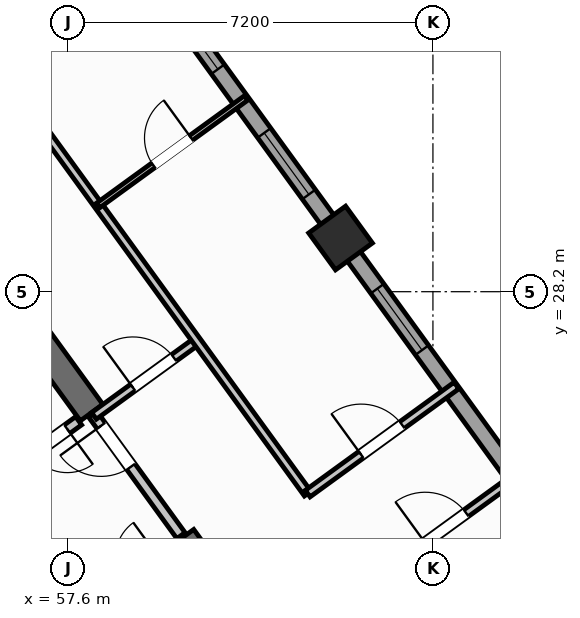
"""IFC4 building model, lengths in metres.
Left out: names, types, materials, properties, quantities, classifications, styles, units other than length and angle.
Written with IfcOpenShell. Run it as: python <this file> out.ifc"""

import sys

from ifc_helpers import new_model, si_unit, direction, frame, frame_2d, origin, origin_2d, place, context, subcontext, project, spatial, rectangle, hollow_rectangle, extrude, source, transform, mapped, element, fill, save


model = new_model("IFC4")
c1 = context("Model", 3, precision=1e-05, world=origin(), true_north=direction((0.0, 1.0)))
c2 = subcontext(c1, "Body", "Model", "MODEL_VIEW")
j1 = project(units=[si_unit("LENGTHUNIT", "METRE"), si_unit("PLANEANGLEUNIT", "RADIAN")], contexts=[c1])
p1 = place(None, origin())
s1 = spatial("IfcSite", under=j1, at=p1, CompositionType="ELEMENT")
p2 = place(p1, origin())
s2 = spatial("IfcBuilding", under=s1, at=p2, CompositionType="ELEMENT")
p3 = place(p2, frame((0.0, 0.0, 165.9)))
s3 = spatial("IfcBuildingStorey", under=s2, at=p3, CompositionType="ELEMENT", Elevation=165.9)
p4 = place(p3, frame((61.958, 20.454, 0.0), z_axis=(0.0, 0.0, 1.0), x_axis=(-0.587802113096, 0.809004744015, 0.0)))
e1 = element("IfcWall", 1, at=p4, inside=s3, PredefinedType="SHEAR", context=c2, shape_type="SweptSolid", body=[
    extrude(rectangle(XDim=3.575, YDim=0.55, at=frame_2d((1.788, 0.0))), origin(), (0.0, 0.0, 1.0), 3.32),
])
p5 = place(p3, frame((58.064, 25.813, 0.0), z_axis=(0.0, 0.0, 1.0), x_axis=(-0.587764933797, 0.809031756236, 0.0)))
e2 = element("IfcWall", 2, at=p5, inside=s3, PredefinedType="SHEAR", context=c2, shape_type="SweptSolid", body=[
    extrude(rectangle(XDim=6.425, YDim=0.55, at=frame_2d((3.212, 0.0))), origin(), (0.0, 0.0, 1.0), 3.32),
])
m1 = source(origin(), c2, "Body", "SweptSolid", [
    extrude(hollow_rectangle(XDim=0.9, YDim=0.9, WallThickness=0.036, at=origin_2d()), origin(), (0.0, 0.0, 1.0), 3.6),
])
p6 = place(p3, frame((62.977, 29.259, 0.0), z_axis=(0.0, 0.0, 1.0), x_axis=(0.809016994375, 0.587785252292, 0.0)))
e3 = element("IfcColumn", 3, at=p6, inside=s3, PredefinedType="COLUMN", context=c2, shape_type="MappedRepresentation", body=[
    mapped(m1, transform((0.0, 0.0, 0.0), scale=1.0)),
])
p7 = place(p3, frame((43.938, 25.192, 0.0), z_axis=(0.0, 0.0, 1.0), x_axis=(0.809016324578, 0.587786174187, 0.0)))
e4 = element("IfcWall", 4, at=p7, inside=s3, PredefinedType="STANDARD", context=c2, shape_type="SweptSolid", body=[
    extrude(rectangle(XDim=17.587, YDim=0.32, at=frame_2d((8.794, 0.0))), origin(), (0.0, 0.0, 1.0), 3.32),
])
p8 = place(p7, frame((14.914, 0.0, 0.0)))
e5 = element("IfcOpeningElement", 5, at=p8, cuts=e4, PredefinedType="OPENING", context=c2, shape_type="SweptSolid", body=[
    extrude(rectangle(XDim=1.05, YDim=2.15, at=frame_2d((0.525, 1.075))), frame((0.0, 0.17, 0.0), z_axis=(0.0, -1.0, 0.0), x_axis=(1.0, 0.0, 0.0)), (0.0, 0.0, 1.0), 0.34),
])
p9 = place(p7, frame((2.144, 0.0, 0.8)))
e6 = element("IfcOpeningElement", 6, at=p9, cuts=e4, PredefinedType="OPENING", context=c2, shape_type="SweptSolid", body=[
    extrude(rectangle(XDim=2.1, YDim=1.55, at=frame_2d((1.05, 0.775))), frame((0.0, 0.17, 0.0), z_axis=(0.0, -1.0, 0.0), x_axis=(1.0, 0.0, 0.0)), (0.0, 0.0, 1.0), 0.34),
])
p10 = place(p7, frame((7.344, 0.0, 0.8)))
e7 = element("IfcOpeningElement", 7, at=p10, cuts=e4, PredefinedType="OPENING", context=c2, shape_type="SweptSolid", body=[
    extrude(rectangle(XDim=2.1, YDim=1.55, at=frame_2d((1.05, 0.775))), frame((0.0, 0.17, 0.0), z_axis=(0.0, -1.0, 0.0), x_axis=(1.0, 0.0, 0.0)), (0.0, 0.0, 1.0), 0.34),
])
p11 = place(p3, frame((58.455, 35.484, 0.0), z_axis=(0.0, 0.0, 1.0), x_axis=(0.587783625747, -0.809018176127, 0.0)))
e8 = element("IfcWall", 8, at=p11, inside=s3, PredefinedType="STANDARD", context=c2, shape_type="SweptSolid", body=[
    extrude(rectangle(XDim=21.587, YDim=0.32, at=frame_2d((10.794, 0.0))), origin(), (0.0, 0.0, 1.0), 2.795),
])
p12 = place(p11, frame((1.475, 0.0, 0.8)))
e9 = element("IfcOpeningElement", 9, at=p12, cuts=e8, PredefinedType="OPENING", context=c2, shape_type="SweptSolid", body=[
    extrude(rectangle(XDim=2.1, YDim=1.55, at=frame_2d((1.05, 0.775))), frame((0.0, 0.17, 0.0), z_axis=(0.0, -1.0, 0.0), x_axis=(1.0, 0.0, 0.0)), (0.0, 0.0, 1.0), 0.34),
])
p13 = place(p11, frame((5.13, 0.0, 0.85)))
e10 = element("IfcOpeningElement", 10, at=p13, cuts=e8, PredefinedType="OPENING", context=c2, shape_type="SweptSolid", body=[
    extrude(rectangle(XDim=1.5, YDim=1.5, at=frame_2d((0.75, 0.75))), frame((0.0, 0.17, 0.0), z_axis=(0.0, -1.0, 0.0), x_axis=(1.0, 0.0, 0.0)), (0.0, 0.0, 1.0), 0.34),
])
p14 = place(p11, frame((8.929, 0.0, 0.85)))
e11 = element("IfcOpeningElement", 11, at=p14, cuts=e8, PredefinedType="OPENING", context=c2, shape_type="SweptSolid", body=[
    extrude(rectangle(XDim=1.5, YDim=1.5, at=frame_2d((0.75, 0.75))), frame((0.0, 0.17, 0.0), z_axis=(0.0, -1.0, 0.0), x_axis=(1.0, 0.0, 0.0)), (0.0, 0.0, 1.0), 0.34),
])
p15 = place(p11, frame((17.581, 0.0, 0.95)))
e12 = element("IfcOpeningElement", 12, at=p15, cuts=e8, PredefinedType="OPENING", context=c2, shape_type="SweptSolid", body=[
    extrude(rectangle(XDim=1.2, YDim=1.4, at=frame_2d((0.6, 0.7))), frame((0.0, 0.17, 0.0), z_axis=(0.0, -1.0, 0.0), x_axis=(1.0, 0.0, 0.0)), (0.0, 0.0, 1.0), 0.34),
])
p16 = place(p3, frame((53.425, 22.468, 0.0), z_axis=(0.0, 0.0, 1.0), x_axis=(0.809024377198, 0.587775090574, 0.0)))
e13 = element("IfcWall", 13, at=p16, inside=s3, PredefinedType="STANDARD", context=c2, shape_type="SweptSolid", body=[
    extrude(rectangle(XDim=5.418, YDim=0.2, at=frame_2d((2.709, 0.0))), origin(), (0.0, 0.0, 1.0), 3.31),
])
p17 = place(p16, frame((4.28, 0.0, 0.0)))
e14 = element("IfcOpeningElement", 14, at=p17, cuts=e13, PredefinedType="OPENING", context=c2, shape_type="SweptSolid", body=[
    extrude(rectangle(XDim=0.86, YDim=2.05, at=frame_2d((0.43, 1.025))), frame((0.0, 0.11, 0.0), z_axis=(0.0, -1.0, 0.0), x_axis=(1.0, 0.0, 0.0)), (0.0, 0.0, 1.0), 0.22),
])
p18 = place(p16, frame((1.45, 0.0, 0.0)))
e15 = element("IfcOpeningElement", 15, at=p18, cuts=e13, PredefinedType="OPENING", context=c2, shape_type="SweptSolid", body=[
    extrude(rectangle(XDim=0.86, YDim=2.05, at=frame_2d((0.43, 1.025))), frame((0.0, 0.11, 0.0), z_axis=(0.0, -1.0, 0.0), x_axis=(1.0, 0.0, 0.0)), (0.0, 0.0, 1.0), 0.22),
])
p19 = place(p3, frame((59.827, 23.386, 0.0), z_axis=(0.0, 0.0, 1.0), x_axis=(-0.587803840107, 0.809003489211, 0.0)))
e16 = element("IfcWall", 16, at=p19, inside=s3, PredefinedType="STANDARD", context=c2, shape_type="SweptSolid", body=[
    extrude(rectangle(XDim=2.96, YDim=0.2, at=frame_2d((1.48, 0.0))), origin(), (0.0, 0.0, 1.0), 3.31),
])
p20 = place(p19, frame((1.68, 0.0, 0.0)))
e17 = element("IfcOpeningElement", 17, at=p20, cuts=e16, PredefinedType="OPENING", context=c2, shape_type="SweptSolid", body=[
    extrude(rectangle(XDim=1.0, YDim=2.1, at=frame_2d((0.5, 1.05))), frame((0.0, 0.11, 0.0), z_axis=(0.0, -1.0, 0.0), x_axis=(1.0, 0.0, 0.0)), (0.0, 0.0, 1.0), 0.22),
])
p21 = place(p3, frame((58.111, 25.749, 0.0), z_axis=(0.0, 0.0, 1.0), x_axis=(0.809000999347, 0.58780726693, 0.0)))
e18 = element("IfcWall", 18, at=p21, inside=s3, PredefinedType="PARTITIONING", context=c2, shape_type="SweptSolid", body=[
    extrude(rectangle(XDim=2.51, YDim=0.16, at=frame_2d((1.255, 0.0))), origin(), (0.0, 0.0, 1.0), 2.795),
])
p22 = place(p21, frame((0.95, 0.0, 0.0)))
e19 = element("IfcOpeningElement", 19, at=p22, cuts=e18, PredefinedType="OPENING", context=c2, shape_type="SweptSolid", body=[
    extrude(rectangle(XDim=1.0, YDim=2.1, at=frame_2d((0.5, 1.05))), frame((0.0, 0.09, 0.0), z_axis=(0.0, -1.0, 0.0), x_axis=(1.0, 0.0, 0.0)), (0.0, 0.0, 1.0), 0.18),
])
p23 = place(p3, frame((62.328, 24.215, 0.0), z_axis=(0.0, 0.0, 1.0), x_axis=(-0.587778600963, 0.809021826807, 0.0)))
e20 = element("IfcWall", 20, at=p23, inside=s3, PredefinedType="PARTITIONING", context=c2, shape_type="SweptSolid", body=[
    extrude(rectangle(XDim=11.45, YDim=0.16, at=frame_2d((5.725, 0.0))), origin(), (0.0, 0.0, 1.0), 3.31),
])
p24 = place(p3, frame((63.592, 22.475, 0.0), z_axis=(0.0, 0.0, 1.0), x_axis=(0.809035546126, 0.58775971715, 0.0)))
e21 = element("IfcWall", 21, at=p24, inside=s3, PredefinedType="PARTITIONING", context=c2, shape_type="SweptSolid", body=[
    extrude(rectangle(XDim=3.63, YDim=0.16, at=frame_2d((1.815, 0.0))), origin(), (0.0, 0.0, 1.0), 3.31),
])
p25 = place(p24, frame((1.305, 0.0, 0.0)))
e22 = element("IfcOpeningElement", 22, at=p25, cuts=e21, PredefinedType="OPENING", context=c2, shape_type="SweptSolid", body=[
    extrude(rectangle(XDim=1.0, YDim=2.1, at=frame_2d((0.5, 1.05))), frame((0.0, 0.09, 0.0), z_axis=(0.0, -1.0, 0.0), x_axis=(1.0, 0.0, 0.0)), (0.0, 0.0, 1.0), 0.18),
])
p26 = place(p3, frame((62.328, 24.215, 0.0), z_axis=(0.0, 0.0, 1.0), x_axis=(0.809003564202, 0.587803736896, 0.0)))
e23 = element("IfcWall", 23, at=p26, inside=s3, PredefinedType="PARTITIONING", context=c2, shape_type="SweptSolid", body=[
    extrude(rectangle(XDim=3.63, YDim=0.16, at=frame_2d((1.815, 0.0))), origin(), (0.0, 0.0, 1.0), 3.31),
])
p27 = place(p26, frame((1.305, 0.0, 0.0)))
e24 = element("IfcOpeningElement", 24, at=p27, cuts=e23, PredefinedType="OPENING", context=c2, shape_type="SweptSolid", body=[
    extrude(rectangle(XDim=1.0, YDim=2.1, at=frame_2d((0.5, 1.05))), frame((0.0, 0.09, 0.0), z_axis=(0.0, -1.0, 0.0), x_axis=(1.0, 0.0, 0.0)), (0.0, 0.0, 1.0), 0.18),
])
p28 = place(p3, frame((58.195, 29.904, 0.0), z_axis=(0.0, 0.0, 1.0), x_axis=(0.809005039917, 0.58780170584, 0.0)))
e25 = element("IfcWall", 25, at=p28, inside=s3, PredefinedType="PARTITIONING", context=c2, shape_type="SweptSolid", body=[
    extrude(rectangle(XDim=3.61, YDim=0.11, at=frame_2d((1.805, 0.0))), origin(), (0.0, 0.0, 1.0), 3.31),
])
p29 = place(p28, frame((1.345, 0.0, 0.0)))
e26 = element("IfcOpeningElement", 26, at=p29, cuts=e25, PredefinedType="OPENING", context=c2, shape_type="SweptSolid", body=[
    extrude(rectangle(XDim=0.92, YDim=2.08, at=frame_2d((0.46, 1.04))), frame((0.0, 0.065, 0.0), z_axis=(0.0, -1.0, 0.0), x_axis=(1.0, 0.0, 0.0)), (0.0, 0.0, 1.0), 0.13),
])
m2 = source(origin(), c2, "Body", "SweptSolid", [
    extrude(rectangle(XDim=2.1, YDim=1.55, at=frame_2d((1.05, 0.775))), frame((0.0, 0.03, 0.0), z_axis=(0.0, -1.0, 0.0), x_axis=(1.0, 0.0, 0.0)), (0.0, 0.0, 1.0), 0.06),
])
p30 = place(p12, origin())
e27 = element("IfcWindow", 27, at=p30, inside=s3, PartitioningType="SINGLE_PANEL", PredefinedType="WINDOW", context=c2, shape_type="MappedRepresentation", body=[
    mapped(m2, transform((0.0, 0.0, 0.0), scale=1.0)),
])
fill(e9, e27)
m3 = source(origin(), c2, "Body", "SweptSolid", [
    extrude(rectangle(XDim=1.5, YDim=1.5, at=frame_2d((0.75, 0.75))), frame((0.0, 0.03, 0.0), z_axis=(0.0, -1.0, 0.0), x_axis=(1.0, 0.0, 0.0)), (0.0, 0.0, 1.0), 0.06),
])
p31 = place(p13, origin())
e28 = element("IfcWindow", 28, at=p31, inside=s3, PartitioningType="SINGLE_PANEL", PredefinedType="WINDOW", context=c2, shape_type="MappedRepresentation", body=[
    mapped(m3, transform((0.0, 0.0, 0.0), scale=1.0)),
])
fill(e10, e28)
p32 = place(p14, origin())
e29 = element("IfcWindow", 29, at=p32, inside=s3, PartitioningType="SINGLE_PANEL", PredefinedType="WINDOW", context=c2, shape_type="MappedRepresentation", body=[
    mapped(m3, transform((0.0, 0.0, 0.0), scale=1.0)),
])
fill(e11, e29)
m4 = source(origin(), c2, "Body", "SweptSolid", [
    extrude(rectangle(XDim=0.86, YDim=2.05, at=frame_2d((0.43, 1.025))), frame((0.0, 0.025, 0.0), z_axis=(0.0, -1.0, 0.0), x_axis=(1.0, 0.0, 0.0)), (0.0, 0.0, 1.0), 0.05),
])
p33 = place(p17, frame((0.86, 0.0, 0.0), z_axis=(0.0, 0.0, 1.0), x_axis=(-1.0, 0.0, 0.0)))
e30 = element("IfcDoor", 30, at=p33, inside=s3, OperationType="SINGLE_SWING_LEFT", PredefinedType="DOOR", context=c2, shape_type="MappedRepresentation", body=[
    mapped(m4, transform((0.0, 0.0, 0.0), scale=1.0)),
])
fill(e14, e30)
m5 = source(origin(), c2, "Body", "SweptSolid", [
    extrude(rectangle(XDim=1.0, YDim=2.1, at=frame_2d((0.5, 1.05))), frame((0.0, 0.025, 0.0), z_axis=(0.0, -1.0, 0.0), x_axis=(1.0, 0.0, 0.0)), (0.0, 0.0, 1.0), 0.05),
])
p34 = place(p22, origin())
e31 = element("IfcDoor", 31, at=p34, inside=s3, OperationType="SINGLE_SWING_LEFT", PredefinedType="DOOR", context=c2, shape_type="MappedRepresentation", body=[
    mapped(m5, transform((0.0, 0.0, 0.0), scale=1.0)),
])
fill(e19, e31)
p35 = place(p20, origin())
e32 = element("IfcDoor", 32, at=p35, inside=s3, OperationType="SINGLE_SWING_RIGHT", PredefinedType="DOOR", context=c2, shape_type="MappedRepresentation", body=[
    mapped(m5, transform((0.0, 0.0, 0.0), scale=1.0)),
])
fill(e17, e32)
p36 = place(p27, origin())
e33 = element("IfcDoor", 33, at=p36, inside=s3, OperationType="SINGLE_SWING_LEFT", PredefinedType="DOOR", context=c2, shape_type="MappedRepresentation", body=[
    mapped(m5, transform((0.0, 0.0, 0.0), scale=1.0)),
])
fill(e24, e33)
m6 = source(origin(), c2, "Body", "SweptSolid", [
    extrude(rectangle(XDim=0.92, YDim=2.08, at=frame_2d((0.46, 1.04))), frame((0.0, 0.025, 0.0), z_axis=(0.0, -1.0, 0.0), x_axis=(1.0, 0.0, 0.0)), (0.0, 0.0, 1.0), 0.05),
])
p37 = place(p29, origin())
e34 = element("IfcDoor", 34, at=p37, inside=s3, OperationType="SINGLE_SWING_RIGHT", PredefinedType="DOOR", context=c2, shape_type="MappedRepresentation", body=[
    mapped(m6, transform((0.0, 0.0, 0.0), scale=1.0)),
])
fill(e26, e34)
p38 = place(p25, origin())
e35 = element("IfcDoor", 35, at=p38, inside=s3, OperationType="SINGLE_SWING_LEFT", PredefinedType="DOOR", context=c2, shape_type="MappedRepresentation", body=[
    mapped(m5, transform((0.0, 0.0, 0.0), scale=1.0)),
])
fill(e22, e35)
save(model, sys.argv[1])
